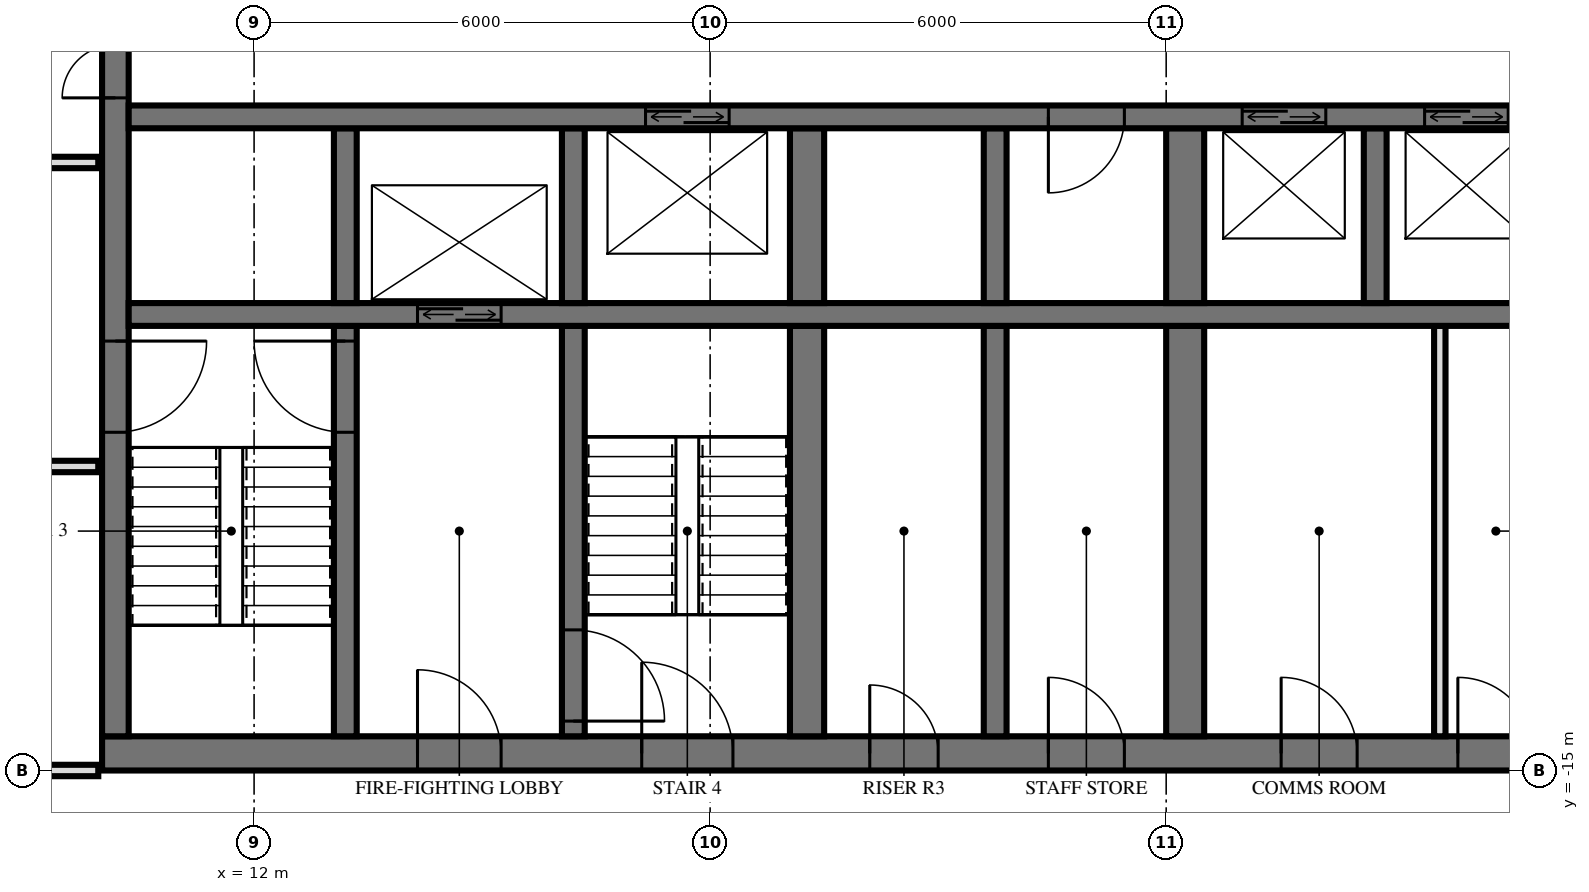
"""IFC4 building model, lengths in metres.
Left out: names, types, materials, properties, quantities, classifications, styles, units other than length and angle.
Written with IfcOpenShell. Run it as: python <this file> out.ifc"""

import sys

from ifc_helpers import new_model, si_unit, direction, frame, frame_2d, origin, place, context, subcontext, project, spatial, rectangle, extrude, element, fill, save


model = new_model("IFC4")
c1 = context("Model", 3, precision=1e-05, world=origin(), true_north=direction((0.0, 1.0)))
c2 = subcontext(c1, "Body", "Model", "MODEL_VIEW")
j1 = project(units=[si_unit("LENGTHUNIT", "METRE"), si_unit("PLANEANGLEUNIT", "RADIAN")], contexts=[c1])
p1 = place(None, origin())
s1 = spatial("IfcSite", under=j1, at=p1, CompositionType="ELEMENT")
p2 = place(p1, origin())
s2 = spatial("IfcBuilding", under=s1, at=p2, CompositionType="ELEMENT")
p3 = place(p2, frame((0.0, 0.0, 38.4)))
s3 = spatial("IfcBuildingStorey", under=s2, at=p3, CompositionType="ELEMENT", Elevation=38.4)
p4 = place(p3, frame((10.0, -14.775, 0.0), z_axis=(0.0, 0.0, 1.0), x_axis=(1.0, 0.0, 0.0)))
e1 = element("IfcWall", 1, at=p4, inside=s3, PredefinedType="SHEAR", context=c2, shape_type="SweptSolid", body=[
    extrude(rectangle(XDim=19.5, YDim=0.45, at=frame_2d((9.75, 0.0))), origin(), (0.0, 0.0, 1.0), 3.6),
])
p5 = place(p4, frame((7.1, 0.0, 0.0)))
e2 = element("IfcOpeningElement", 2, at=p5, cuts=e1, PredefinedType="OPENING", context=c2, shape_type="SweptSolid", body=[
    extrude(rectangle(XDim=1.2, YDim=2.1, at=frame_2d((0.6, 1.05))), frame((0.0, 0.235, 0.0), z_axis=(0.0, -1.0, 0.0), x_axis=(1.0, 0.0, 0.0)), (0.0, 0.0, 1.0), 0.47),
])
p6 = place(p4, frame((4.15, 0.0, 0.0)))
e3 = element("IfcOpeningElement", 3, at=p6, cuts=e1, PredefinedType="OPENING", context=c2, shape_type="SweptSolid", body=[
    extrude(rectangle(XDim=1.1, YDim=2.1, at=frame_2d((0.55, 1.05))), frame((0.0, 0.235, 0.0), z_axis=(0.0, -1.0, 0.0), x_axis=(1.0, 0.0, 0.0)), (0.0, 0.0, 1.0), 0.47),
])
p7 = place(p4, frame((10.1, 0.0, 0.0)))
e4 = element("IfcOpeningElement", 4, at=p7, cuts=e1, PredefinedType="OPENING", context=c2, shape_type="SweptSolid", body=[
    extrude(rectangle(XDim=0.9, YDim=2.1, at=frame_2d((0.45, 1.05))), frame((0.0, 0.235, 0.0), z_axis=(0.0, -1.0, 0.0), x_axis=(1.0, 0.0, 0.0)), (0.0, 0.0, 1.0), 0.47),
])
p8 = place(p4, frame((12.45, 0.0, 0.0)))
e5 = element("IfcOpeningElement", 5, at=p8, cuts=e1, PredefinedType="OPENING", context=c2, shape_type="SweptSolid", body=[
    extrude(rectangle(XDim=1.0, YDim=2.1, at=frame_2d((0.5, 1.05))), frame((0.0, 0.235, 0.0), z_axis=(0.0, -1.0, 0.0), x_axis=(1.0, 0.0, 0.0)), (0.0, 0.0, 1.0), 0.47),
])
p9 = place(p4, frame((15.512, 0.0, 0.0)))
e6 = element("IfcOpeningElement", 6, at=p9, cuts=e1, PredefinedType="OPENING", context=c2, shape_type="SweptSolid", body=[
    extrude(rectangle(XDim=1.0, YDim=2.1, at=frame_2d((0.5, 1.05))), frame((0.0, 0.235, 0.0), z_axis=(0.0, -1.0, 0.0), x_axis=(1.0, 0.0, 0.0)), (0.0, 0.0, 1.0), 0.47),
])
p10 = place(p4, frame((17.837, 0.0, 0.0)))
e7 = element("IfcOpeningElement", 7, at=p10, cuts=e1, PredefinedType="OPENING", context=c2, shape_type="SweptSolid", body=[
    extrude(rectangle(XDim=1.0, YDim=2.1, at=frame_2d((0.5, 1.05))), frame((0.0, 0.235, 0.0), z_axis=(0.0, -1.0, 0.0), x_axis=(1.0, 0.0, 0.0)), (0.0, 0.0, 1.0), 0.47),
])
p11 = place(p3, frame((10.175, -14.55, 0.0), z_axis=(0.0, 0.0, 1.0), x_axis=(0.0, 1.0, 0.0)))
e8 = element("IfcWall", 8, at=p11, inside=s3, PredefinedType="SHEAR", context=c2, shape_type="SweptSolid", body=[
    extrude(rectangle(XDim=14.1, YDim=0.35, at=frame_2d((7.05, 0.0))), origin(), (0.0, 0.0, 1.0), 3.6),
])
p12 = place(p11, frame((8.4, 0.0, 0.0)))
e9 = element("IfcOpeningElement", 9, at=p12, cuts=e8, PredefinedType="OPENING", context=c2, shape_type="SweptSolid", body=[
    extrude(rectangle(XDim=1.4, YDim=2.4, at=frame_2d((0.7, 1.2))), frame((0.0, 0.185, 0.0), z_axis=(0.0, -1.0, 0.0), x_axis=(1.0, 0.0, 0.0)), (0.0, 0.0, 1.0), 0.37),
])
p13 = place(p11, frame((10.0, 0.0, 0.0)))
e10 = element("IfcOpeningElement", 10, at=p13, cuts=e8, PredefinedType="OPENING", context=c2, shape_type="SweptSolid", body=[
    extrude(rectangle(XDim=1.4, YDim=2.4, at=frame_2d((0.7, 1.2))), frame((0.0, 0.185, 0.0), z_axis=(0.0, -1.0, 0.0), x_axis=(1.0, 0.0, 0.0)), (0.0, 0.0, 1.0), 0.37),
])
p14 = place(p11, frame((4.0, 0.0, 0.0)))
e11 = element("IfcOpeningElement", 11, at=p14, cuts=e8, PredefinedType="OPENING", context=c2, shape_type="SweptSolid", body=[
    extrude(rectangle(XDim=1.2, YDim=2.1, at=frame_2d((0.6, 1.05))), frame((0.0, 0.185, 0.0), z_axis=(0.0, -1.0, 0.0), x_axis=(1.0, 0.0, 0.0)), (0.0, 0.0, 1.0), 0.37),
])
p15 = place(p3, frame((10.35, -6.4, 0.0), z_axis=(0.0, 0.0, 1.0), x_axis=(1.0, 0.0, 0.0)))
e12 = element("IfcWall", 12, at=p15, inside=s3, PredefinedType="SHEAR", context=c2, shape_type="SweptSolid", body=[
    extrude(rectangle(XDim=18.7, YDim=0.3, at=frame_2d((9.35, 0.0))), origin(), (0.0, 0.0, 1.0), 3.6),
])
p16 = place(p15, frame((14.65, 0.0, 0.0)))
e13 = element("IfcOpeningElement", 13, at=p16, cuts=e12, PredefinedType="OPENING", context=c2, shape_type="SweptSolid", body=[
    extrude(rectangle(XDim=1.1, YDim=2.1, at=frame_2d((0.55, 1.05))), frame((0.0, 0.16, 0.0), z_axis=(0.0, -1.0, 0.0), x_axis=(1.0, 0.0, 0.0)), (0.0, 0.0, 1.0), 0.32),
])
p17 = place(p15, frame((17.05, 0.0, 0.0)))
e14 = element("IfcOpeningElement", 14, at=p17, cuts=e12, PredefinedType="OPENING", context=c2, shape_type="SweptSolid", body=[
    extrude(rectangle(XDim=1.1, YDim=2.1, at=frame_2d((0.55, 1.05))), frame((0.0, 0.16, 0.0), z_axis=(0.0, -1.0, 0.0), x_axis=(1.0, 0.0, 0.0)), (0.0, 0.0, 1.0), 0.32),
])
p18 = place(p15, frame((6.8, 0.0, 0.0)))
e15 = element("IfcOpeningElement", 15, at=p18, cuts=e12, PredefinedType="OPENING", context=c2, shape_type="SweptSolid", body=[
    extrude(rectangle(XDim=1.1, YDim=2.1, at=frame_2d((0.55, 1.05))), frame((0.0, 0.16, 0.0), z_axis=(0.0, -1.0, 0.0), x_axis=(1.0, 0.0, 0.0)), (0.0, 0.0, 1.0), 0.32),
])
p19 = place(p15, frame((12.1, 0.0, 0.0)))
e16 = element("IfcOpeningElement", 16, at=p19, cuts=e12, PredefinedType="OPENING", context=c2, shape_type="SweptSolid", body=[
    extrude(rectangle(XDim=1.0, YDim=2.1, at=frame_2d((0.5, 1.05))), frame((0.0, 0.16, 0.0), z_axis=(0.0, -1.0, 0.0), x_axis=(1.0, 0.0, 0.0)), (0.0, 0.0, 1.0), 0.32),
])
p20 = place(p3, frame((10.35, -9.0, 0.0), z_axis=(0.0, 0.0, 1.0), x_axis=(1.0, 0.0, 0.0)))
e17 = element("IfcWall", 17, at=p20, inside=s3, PredefinedType="SHEAR", context=c2, shape_type="SweptSolid", body=[
    extrude(rectangle(XDim=18.7, YDim=0.3, at=frame_2d((9.35, 0.0))), origin(), (0.0, 0.0, 1.0), 3.6),
])
p21 = place(p20, frame((3.8, 0.0, 0.0)))
e18 = element("IfcOpeningElement", 18, at=p21, cuts=e17, PredefinedType="OPENING", context=c2, shape_type="SweptSolid", body=[
    extrude(rectangle(XDim=1.1, YDim=2.1, at=frame_2d((0.55, 1.05))), frame((0.0, 0.16, 0.0), z_axis=(0.0, -1.0, 0.0), x_axis=(1.0, 0.0, 0.0)), (0.0, 0.0, 1.0), 0.32),
])
p22 = place(p3, frame((13.2, -8.85, 0.0), z_axis=(0.0, 0.0, 1.0), x_axis=(0.0, 1.0, 0.0)))
e19 = element("IfcWall", 19, at=p22, inside=s3, PredefinedType="SHEAR", context=c2, shape_type="SweptSolid", body=[
    extrude(rectangle(XDim=2.3, YDim=0.3, at=frame_2d((1.15, 0.0))), origin(), (0.0, 0.0, 1.0), 3.6),
])
p23 = place(p3, frame((13.2, -14.55, 0.0), z_axis=(0.0, 0.0, 1.0), x_axis=(0.0, 1.0, 0.0)))
e20 = element("IfcWall", 20, at=p23, inside=s3, PredefinedType="SHEAR", context=c2, shape_type="SweptSolid", body=[
    extrude(rectangle(XDim=5.4, YDim=0.3, at=frame_2d((2.7, 0.0))), origin(), (0.0, 0.0, 1.0), 3.6),
])
p24 = place(p23, frame((4.0, 0.0, 0.0)))
e21 = element("IfcOpeningElement", 21, at=p24, cuts=e20, PredefinedType="OPENING", context=c2, shape_type="SweptSolid", body=[
    extrude(rectangle(XDim=1.2, YDim=2.1, at=frame_2d((0.6, 1.05))), frame((0.0, 0.16, 0.0), z_axis=(0.0, -1.0, 0.0), x_axis=(1.0, 0.0, 0.0)), (0.0, 0.0, 1.0), 0.32),
])
p25 = place(p3, frame((16.2, -8.85, 0.0), z_axis=(0.0, 0.0, 1.0), x_axis=(0.0, 1.0, 0.0)))
e22 = element("IfcWall", 22, at=p25, inside=s3, PredefinedType="SHEAR", context=c2, shape_type="SweptSolid", body=[
    extrude(rectangle(XDim=2.3, YDim=0.3, at=frame_2d((1.15, 0.0))), origin(), (0.0, 0.0, 1.0), 3.6),
])
p26 = place(p3, frame((16.2, -14.55, 0.0), z_axis=(0.0, 0.0, 1.0), x_axis=(0.0, 1.0, 0.0)))
e23 = element("IfcWall", 23, at=p26, inside=s3, PredefinedType="SHEAR", context=c2, shape_type="SweptSolid", body=[
    extrude(rectangle(XDim=5.4, YDim=0.3, at=frame_2d((2.7, 0.0))), origin(), (0.0, 0.0, 1.0), 3.6),
])
p27 = place(p26, frame((0.2, 0.0, 0.0)))
e24 = element("IfcOpeningElement", 24, at=p27, cuts=e23, PredefinedType="OPENING", context=c2, shape_type="SweptSolid", body=[
    extrude(rectangle(XDim=1.2, YDim=2.1, at=frame_2d((0.6, 1.05))), frame((0.0, 0.16, 0.0), z_axis=(0.0, -1.0, 0.0), x_axis=(1.0, 0.0, 0.0)), (0.0, 0.0, 1.0), 0.32),
])
p28 = place(p3, frame((19.275, -8.85, 0.0), z_axis=(0.0, 0.0, 1.0), x_axis=(0.0, 1.0, 0.0)))
e25 = element("IfcWall", 25, at=p28, inside=s3, PredefinedType="SHEAR", context=c2, shape_type="SweptSolid", body=[
    extrude(rectangle(XDim=2.3, YDim=0.45, at=frame_2d((1.15, 0.0))), origin(), (0.0, 0.0, 1.0), 3.6),
])
p29 = place(p3, frame((19.275, -14.55, 0.0), z_axis=(0.0, 0.0, 1.0), x_axis=(0.0, 1.0, 0.0)))
e26 = element("IfcWall", 26, at=p29, inside=s3, PredefinedType="SHEAR", context=c2, shape_type="SweptSolid", body=[
    extrude(rectangle(XDim=5.4, YDim=0.45, at=frame_2d((2.7, 0.0))), origin(), (0.0, 0.0, 1.0), 3.6),
])
p30 = place(p3, frame((21.75, -8.85, 0.0), z_axis=(0.0, 0.0, 1.0), x_axis=(0.0, 1.0, 0.0)))
e27 = element("IfcWall", 27, at=p30, inside=s3, PredefinedType="SHEAR", context=c2, shape_type="SweptSolid", body=[
    extrude(rectangle(XDim=2.3, YDim=0.3, at=frame_2d((1.15, 0.0))), origin(), (0.0, 0.0, 1.0), 3.6),
])
p31 = place(p3, frame((21.75, -14.55, 0.0), z_axis=(0.0, 0.0, 1.0), x_axis=(0.0, 1.0, 0.0)))
e28 = element("IfcWall", 28, at=p31, inside=s3, PredefinedType="SHEAR", context=c2, shape_type="SweptSolid", body=[
    extrude(rectangle(XDim=5.4, YDim=0.3, at=frame_2d((2.7, 0.0))), origin(), (0.0, 0.0, 1.0), 3.6),
])
p32 = place(p3, frame((24.25, -8.85, 0.0), z_axis=(0.0, 0.0, 1.0), x_axis=(0.0, 1.0, 0.0)))
e29 = element("IfcWall", 29, at=p32, inside=s3, PredefinedType="SHEAR", context=c2, shape_type="SweptSolid", body=[
    extrude(rectangle(XDim=2.3, YDim=0.5, at=frame_2d((1.15, 0.0))), origin(), (0.0, 0.0, 1.0), 3.6),
])
p33 = place(p3, frame((24.25, -14.55, 0.0), z_axis=(0.0, 0.0, 1.0), x_axis=(0.0, 1.0, 0.0)))
e30 = element("IfcWall", 30, at=p33, inside=s3, PredefinedType="SHEAR", context=c2, shape_type="SweptSolid", body=[
    extrude(rectangle(XDim=5.4, YDim=0.5, at=frame_2d((2.7, 0.0))), origin(), (0.0, 0.0, 1.0), 3.6),
])
p34 = place(p3, frame((26.75, -8.85, 0.0), z_axis=(0.0, 0.0, 1.0), x_axis=(0.0, 1.0, 0.0)))
e31 = element("IfcWall", 31, at=p34, inside=s3, PredefinedType="SHEAR", context=c2, shape_type="SweptSolid", body=[
    extrude(rectangle(XDim=2.3, YDim=0.3, at=frame_2d((1.15, 0.0))), origin(), (0.0, 0.0, 1.0), 3.6),
])
p35 = place(p3, frame((27.6, -14.55, 0.0), z_axis=(0.0, 0.0, 1.0), x_axis=(0.0, 1.0, 0.0)))
e32 = element("IfcWall", 32, at=p35, inside=s3, PredefinedType="PARTITIONING", context=c2, shape_type="SweptSolid", body=[
    extrude(rectangle(XDim=5.4, YDim=0.15, at=frame_2d((2.7, 0.0))), origin(), (0.0, 0.0, 1.0), 3.3),
])
p36 = place(p3, frame((-9.95, -15.0, 0.0), z_axis=(0.0, 0.0, 1.0), x_axis=(1.0, 0.0, 0.0)))
e33 = element("IfcWall", 33, at=p36, inside=s3, PredefinedType="PARTITIONING", context=c2, shape_type="SweptSolid", body=[
    extrude(rectangle(XDim=19.9, YDim=0.15, at=frame_2d((9.95, 0.0))), origin(), (0.0, 0.0, 1.0), 2.684),
])
p37 = place(p36, frame((9.45, 0.0, 0.0)))
e34 = element("IfcOpeningElement", 34, at=p37, cuts=e33, PredefinedType="OPENING", context=c2, shape_type="SweptSolid", body=[
    extrude(rectangle(XDim=1.0, YDim=2.1, at=frame_2d((0.5, 1.05))), frame((0.0, 0.085, 0.0), z_axis=(0.0, -1.0, 0.0), x_axis=(1.0, 0.0, 0.0)), (0.0, 0.0, 1.0), 0.17),
])
p38 = place(p3, frame((-9.95, -11.0, 0.0), z_axis=(0.0, 0.0, 1.0), x_axis=(1.0, 0.0, 0.0)))
e35 = element("IfcWall", 35, at=p38, inside=s3, PredefinedType="PARTITIONING", context=c2, shape_type="SweptSolid", body=[
    extrude(rectangle(XDim=19.9, YDim=0.15, at=frame_2d((9.95, 0.0))), origin(), (0.0, 0.0, 1.0), 3.32),
])
p39 = place(p38, frame((9.45, 0.0, 0.0)))
e36 = element("IfcOpeningElement", 36, at=p39, cuts=e35, PredefinedType="OPENING", context=c2, shape_type="SweptSolid", body=[
    extrude(rectangle(XDim=1.0, YDim=2.1, at=frame_2d((0.5, 1.05))), frame((0.0, 0.085, 0.0), z_axis=(0.0, -1.0, 0.0), x_axis=(1.0, 0.0, 0.0)), (0.0, 0.0, 1.0), 0.17),
])
p40 = place(p38, frame((3.45, 0.0, 0.0)))
e37 = element("IfcOpeningElement", 37, at=p40, cuts=e35, PredefinedType="OPENING", context=c2, shape_type="SweptSolid", body=[
    extrude(rectangle(XDim=1.0, YDim=2.1, at=frame_2d((0.5, 1.05))), frame((0.0, 0.085, 0.0), z_axis=(0.0, -1.0, 0.0), x_axis=(1.0, 0.0, 0.0)), (0.0, 0.0, 1.0), 0.17),
])
p41 = place(p3, frame((-9.95, -7.0, 0.0), z_axis=(0.0, 0.0, 1.0), x_axis=(1.0, 0.0, 0.0)))
e38 = element("IfcWall", 38, at=p41, inside=s3, PredefinedType="PARTITIONING", context=c2, shape_type="SweptSolid", body=[
    extrude(rectangle(XDim=19.9, YDim=0.15, at=frame_2d((9.95, 0.0))), origin(), (0.0, 0.0, 1.0), 3.32),
])
p42 = place(p41, frame((9.45, 0.0, 0.0)))
e39 = element("IfcOpeningElement", 39, at=p42, cuts=e38, PredefinedType="OPENING", context=c2, shape_type="SweptSolid", body=[
    extrude(rectangle(XDim=1.0, YDim=2.1, at=frame_2d((0.5, 1.05))), frame((0.0, 0.085, 0.0), z_axis=(0.0, -1.0, 0.0), x_axis=(1.0, 0.0, 0.0)), (0.0, 0.0, 1.0), 0.17),
])
p43 = place(p41, frame((15.45, 0.0, 0.0)))
e40 = element("IfcOpeningElement", 40, at=p43, cuts=e38, PredefinedType="OPENING", context=c2, shape_type="SweptSolid", body=[
    extrude(rectangle(XDim=1.0, YDim=2.1, at=frame_2d((0.5, 1.05))), frame((0.0, 0.085, 0.0), z_axis=(0.0, -1.0, 0.0), x_axis=(1.0, 0.0, 0.0)), (0.0, 0.0, 1.0), 0.17),
])
p44 = place(p16, origin())
e41 = element("IfcDoor", 41, at=p44, inside=s3, OperationType="DOUBLE_DOOR_SLIDING", PredefinedType="USERDEFINED", context=c2, shape_type="SweptSolid", body=[
    extrude(rectangle(XDim=1.1, YDim=2.1, at=frame_2d((0.55, 1.05))), frame((0.0, 0.025, 0.0), z_axis=(0.0, -1.0, 0.0), x_axis=(1.0, 0.0, 0.0)), (0.0, 0.0, 1.0), 0.05),
])
fill(e13, e41)
p45 = place(p17, origin())
e42 = element("IfcDoor", 42, at=p45, inside=s3, OperationType="DOUBLE_DOOR_SLIDING", PredefinedType="USERDEFINED", context=c2, shape_type="SweptSolid", body=[
    extrude(rectangle(XDim=1.1, YDim=2.1, at=frame_2d((0.55, 1.05))), frame((0.0, 0.025, 0.0), z_axis=(0.0, -1.0, 0.0), x_axis=(1.0, 0.0, 0.0)), (0.0, 0.0, 1.0), 0.05),
])
fill(e14, e42)
p46 = place(p21, origin())
e43 = element("IfcDoor", 43, at=p46, inside=s3, OperationType="DOUBLE_DOOR_SLIDING", PredefinedType="USERDEFINED", context=c2, shape_type="SweptSolid", body=[
    extrude(rectangle(XDim=1.1, YDim=2.1, at=frame_2d((0.55, 1.05))), frame((0.0, 0.025, 0.0), z_axis=(0.0, -1.0, 0.0), x_axis=(1.0, 0.0, 0.0)), (0.0, 0.0, 1.0), 0.05),
])
fill(e18, e43)
p47 = place(p18, origin())
e44 = element("IfcDoor", 44, at=p47, inside=s3, OperationType="DOUBLE_DOOR_SLIDING", PredefinedType="USERDEFINED", context=c2, shape_type="SweptSolid", body=[
    extrude(rectangle(XDim=1.1, YDim=2.1, at=frame_2d((0.55, 1.05))), frame((0.0, 0.025, 0.0), z_axis=(0.0, -1.0, 0.0), x_axis=(1.0, 0.0, 0.0)), (0.0, 0.0, 1.0), 0.05),
])
fill(e15, e44)
p48 = place(p12, origin())
e45 = element("IfcDoor", 45, at=p48, inside=s3, OperationType="DOUBLE_DOOR_SINGLE_SWING", PredefinedType="DOOR", context=c2, shape_type="SweptSolid", body=[
    extrude(rectangle(XDim=1.4, YDim=2.4, at=frame_2d((0.7, 1.2))), frame((0.0, 0.025, 0.0), z_axis=(0.0, -1.0, 0.0), x_axis=(1.0, 0.0, 0.0)), (0.0, 0.0, 1.0), 0.05),
])
fill(e9, e45)
p49 = place(p14, frame((0.6, 0.0, 0.0), z_axis=(0.0, 0.0, 1.0), x_axis=(-1.0, 0.0, 0.0)))
e46 = element("IfcDoor", 46, at=p49, inside=s3, OperationType="SINGLE_SWING_RIGHT", PredefinedType="DOOR", context=c2, shape_type="SweptSolid", body=[
    extrude(rectangle(XDim=1.2, YDim=2.1, at=frame_2d((0.0, 1.05))), frame((0.0, -0.025, 0.0), z_axis=(0.0, 1.0, 0.0), x_axis=(-1.0, 0.0, 0.0)), (0.0, 0.0, 1.0), 0.05),
])
fill(e11, e46)
p50 = place(p5, origin())
e47 = element("IfcDoor", 47, at=p50, inside=s3, OperationType="SINGLE_SWING_RIGHT", PredefinedType="DOOR", context=c2, shape_type="SweptSolid", body=[
    extrude(rectangle(XDim=1.2, YDim=2.1, at=frame_2d((0.6, 1.05))), frame((0.0, 0.025, 0.0), z_axis=(0.0, -1.0, 0.0), x_axis=(1.0, 0.0, 0.0)), (0.0, 0.0, 1.0), 0.05),
])
fill(e2, e47)
p51 = place(p6, origin())
e48 = element("IfcDoor", 48, at=p51, inside=s3, OperationType="SINGLE_SWING_RIGHT", PredefinedType="DOOR", context=c2, shape_type="SweptSolid", body=[
    extrude(rectangle(XDim=1.1, YDim=2.1, at=frame_2d((0.55, 1.05))), frame((0.0, 0.025, 0.0), z_axis=(0.0, -1.0, 0.0), x_axis=(1.0, 0.0, 0.0)), (0.0, 0.0, 1.0), 0.05),
])
fill(e3, e48)
p52 = place(p7, origin())
e49 = element("IfcDoor", 49, at=p52, inside=s3, OperationType="SINGLE_SWING_RIGHT", PredefinedType="DOOR", context=c2, shape_type="SweptSolid", body=[
    extrude(rectangle(XDim=0.9, YDim=2.1, at=frame_2d((0.45, 1.05))), frame((0.0, 0.025, 0.0), z_axis=(0.0, -1.0, 0.0), x_axis=(1.0, 0.0, 0.0)), (0.0, 0.0, 1.0), 0.05),
])
fill(e4, e49)
p53 = place(p8, origin())
e50 = element("IfcDoor", 50, at=p53, inside=s3, OperationType="SINGLE_SWING_RIGHT", PredefinedType="DOOR", context=c2, shape_type="SweptSolid", body=[
    extrude(rectangle(XDim=1.0, YDim=2.1, at=frame_2d((0.5, 1.05))), frame((0.0, 0.025, 0.0), z_axis=(0.0, -1.0, 0.0), x_axis=(1.0, 0.0, 0.0)), (0.0, 0.0, 1.0), 0.05),
])
fill(e5, e50)
p54 = place(p9, origin())
e51 = element("IfcDoor", 51, at=p54, inside=s3, OperationType="SINGLE_SWING_RIGHT", PredefinedType="DOOR", context=c2, shape_type="SweptSolid", body=[
    extrude(rectangle(XDim=1.0, YDim=2.1, at=frame_2d((0.5, 1.05))), frame((0.0, 0.025, 0.0), z_axis=(0.0, -1.0, 0.0), x_axis=(1.0, 0.0, 0.0)), (0.0, 0.0, 1.0), 0.05),
])
fill(e6, e51)
p55 = place(p10, origin())
e52 = element("IfcDoor", 52, at=p55, inside=s3, OperationType="SINGLE_SWING_RIGHT", PredefinedType="DOOR", context=c2, shape_type="SweptSolid", body=[
    extrude(rectangle(XDim=1.0, YDim=2.1, at=frame_2d((0.5, 1.05))), frame((0.0, 0.025, 0.0), z_axis=(0.0, -1.0, 0.0), x_axis=(1.0, 0.0, 0.0)), (0.0, 0.0, 1.0), 0.05),
])
fill(e7, e52)
p56 = place(p19, frame((0.5, 0.0, 0.0), z_axis=(0.0, 0.0, 1.0), x_axis=(-1.0, 0.0, 0.0)))
e53 = element("IfcDoor", 53, at=p56, inside=s3, OperationType="SINGLE_SWING_LEFT", PredefinedType="DOOR", context=c2, shape_type="SweptSolid", body=[
    extrude(rectangle(XDim=1.0, YDim=2.1, at=frame_2d((0.0, 1.05))), frame((0.0, -0.025, 0.0), z_axis=(0.0, 1.0, 0.0), x_axis=(-1.0, 0.0, 0.0)), (0.0, 0.0, 1.0), 0.05),
])
fill(e16, e53)
p57 = place(p24, origin())
e54 = element("IfcDoor", 54, at=p57, inside=s3, OperationType="SINGLE_SWING_LEFT", PredefinedType="DOOR", context=c2, shape_type="SweptSolid", body=[
    extrude(rectangle(XDim=1.2, YDim=2.1, at=frame_2d((0.6, 1.05))), frame((0.0, 0.025, 0.0), z_axis=(0.0, -1.0, 0.0), x_axis=(1.0, 0.0, 0.0)), (0.0, 0.0, 1.0), 0.05),
])
fill(e21, e54)
p58 = place(p27, frame((0.6, 0.0, 0.0), z_axis=(0.0, 0.0, 1.0), x_axis=(-1.0, 0.0, 0.0)))
e55 = element("IfcDoor", 55, at=p58, inside=s3, OperationType="SINGLE_SWING_LEFT", PredefinedType="DOOR", context=c2, shape_type="SweptSolid", body=[
    extrude(rectangle(XDim=1.2, YDim=2.1, at=frame_2d((0.0, 1.05))), frame((0.0, -0.025, 0.0), z_axis=(0.0, 1.0, 0.0), x_axis=(-1.0, 0.0, 0.0)), (0.0, 0.0, 1.0), 0.05),
])
fill(e24, e55)
save(model, sys.argv[1])
